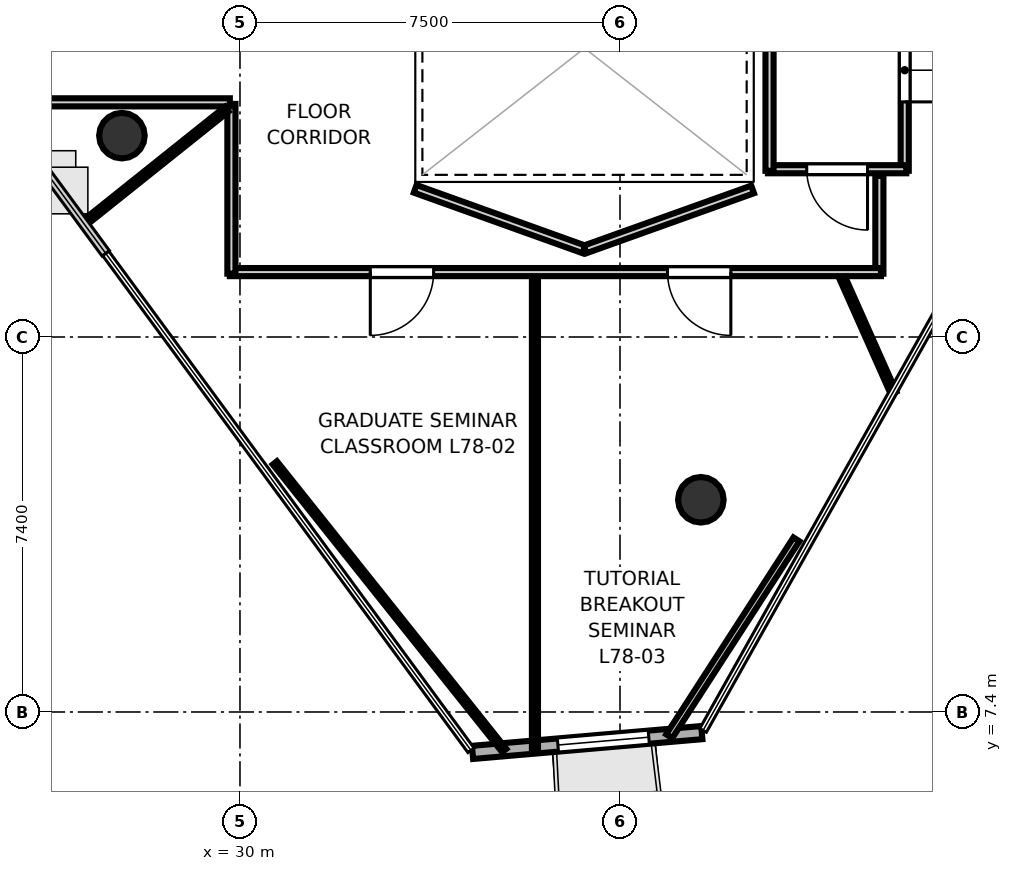
"""IFC4 building model, lengths in metres.
Left out: names, types, materials, properties, quantities, classifications, styles, units other than length and angle.
Written with IfcOpenShell. Run it as: python <this file> out.ifc"""

import sys

from ifc_helpers import new_model, si_unit, direction, frame, frame_2d, origin, origin_2d, place, context, subcontext, project, spatial, rectangle, hollow_circle, extrude, element, fill, save


model = new_model("IFC4")
c1 = context("Model", 3, precision=1e-05, world=origin(), true_north=direction((0.0, 1.0)))
c2 = subcontext(c1, "Body", "Model", "MODEL_VIEW")
j1 = project(units=[si_unit("LENGTHUNIT", "METRE"), si_unit("PLANEANGLEUNIT", "RADIAN")], contexts=[c1])
p1 = place(None, origin())
s1 = spatial("IfcSite", under=j1, at=p1, CompositionType="ELEMENT")
p2 = place(p1, origin())
s2 = spatial("IfcBuilding", under=s1, at=p2, CompositionType="ELEMENT")
p3 = place(p2, frame((0.0, 0.0, 302.8)))
s3 = spatial("IfcBuildingStorey", under=s2, at=p3, CompositionType="ELEMENT", Elevation=302.8)
for number, where, z_axis, x_axis in (
    (1, (27.67, 18.774, 0.0), (0.0, 0.0, 1.0), (1.0, 0.0, 0.0)),
    (2, (39.096, 11.588, 0.0), (0.0, 0.0, 1.0), (1.0, 0.0, 0.0)),
):
    element("IfcColumn", number, at=place(p3, frame(where, z_axis=z_axis, x_axis=x_axis)), inside=s3, PredefinedType="COLUMN", context=c2, shape_type="SweptSolid", body=[
        extrude(hollow_circle(Radius=0.45, WallThickness=0.025, at=origin_2d()), origin(), (0.0, 0.0, 1.0), 3.7),
    ])
p4 = place(p3, frame((34.59, 6.603, 0.0), z_axis=(0.0, 0.0, 1.0), x_axis=(0.996294451757, 0.086007937996, 0.0)))
e3 = element("IfcWall", 3, at=p4, inside=s3, PredefinedType="SOLIDWALL", context=c2, shape_type="SweptSolid", body=[
    extrude(rectangle(XDim=4.542, YDim=0.26, at=frame_2d((2.271, 0.0))), origin(), (0.0, 0.0, 1.0), 3.52),
])
p5 = place(p4, frame((1.691, 0.0, 0.85)))
e4 = element("IfcOpeningElement", 4, at=p5, cuts=e3, PredefinedType="OPENING", context=c2, shape_type="SweptSolid", body=[
    extrude(rectangle(XDim=1.8, YDim=2.1, at=frame_2d((0.9, 1.05))), frame((0.0, 0.14, 0.0), z_axis=(0.0, -1.0, 0.0), x_axis=(1.0, 0.0, 0.0)), (0.0, 0.0, 1.0), 0.28),
])
p6 = place(p3, frame((43.119, 22.05, 0.0), z_axis=(0.0, 0.0, 1.0), x_axis=(0.0, -1.0, 0.0)))
e5 = element("IfcWall", 5, at=p6, inside=s3, PredefinedType="PARTITIONING", context=c2, shape_type="SweptSolid", body=[
    extrude(rectangle(XDim=3.97, YDim=0.16, at=frame_2d((1.985, 0.0))), origin(), (0.0, 0.0, 1.0), 2.84),
])
p7 = place(p6, frame((1.36, 0.0, 0.0)))
e6 = element("IfcOpeningElement", 6, at=p7, cuts=e5, PredefinedType="OPENING", context=c2, shape_type="SweptSolid", body=[
    extrude(rectangle(XDim=1.25, YDim=2.2, at=frame_2d((0.625, 1.1))), frame((0.0, 0.09, 0.0), z_axis=(0.0, -1.0, 0.0), x_axis=(1.0, 0.0, 0.0)), (0.0, 0.0, 1.0), 0.18),
])
p8 = place(p3, frame((43.15, 18.111, 0.0), z_axis=(0.0, 0.0, 1.0), x_axis=(-1.0, 0.0, 0.0)))
e7 = element("IfcWall", 7, at=p8, inside=s3, PredefinedType="PARTITIONING", context=c2, shape_type="SweptSolid", body=[
    extrude(rectangle(XDim=2.73, YDim=0.16, at=frame_2d((1.365, 0.0))), origin(), (0.0, 0.0, 1.0), 2.84),
])
p9 = place(p8, frame((0.765, 0.0, 0.0)))
e8 = element("IfcOpeningElement", 8, at=p9, cuts=e7, PredefinedType="OPENING", context=c2, shape_type="SweptSolid", body=[
    extrude(rectangle(XDim=1.2, YDim=2.15, at=frame_2d((0.6, 1.075))), frame((0.0, 0.09, 0.0), z_axis=(0.0, -1.0, 0.0), x_axis=(1.0, 0.0, 0.0)), (0.0, 0.0, 1.0), 0.18),
])
p10 = place(p3, frame((40.451, 18.08, 0.0), z_axis=(0.0, 0.0, 1.0), x_axis=(0.0, 1.0, 0.0)))
e9 = element("IfcWall", 9, at=p10, inside=s3, PredefinedType="PARTITIONING", context=c2, shape_type="SweptSolid", body=[
    extrude(rectangle(XDim=3.32, YDim=0.16, at=frame_2d((1.66, 0.0))), origin(), (0.0, 0.0, 1.0), 2.84),
])
p11 = place(p3, frame((33.458, 17.724, 0.0), z_axis=(0.0, 0.0, 1.0), x_axis=(0.94128854789, -0.337603124408, 0.0)))
e10 = element("IfcWall", 10, at=p11, inside=s3, PredefinedType="PARTITIONING", context=c2, shape_type="SweptSolid", body=[
    extrude(rectangle(XDim=3.54, YDim=0.16, at=frame_2d((1.77, 0.0))), origin(), (0.0, 0.0, 1.0), 2.84),
])
p12 = place(p3, frame((36.81, 16.529, 0.0), z_axis=(0.0, 0.0, 1.0), x_axis=(0.941548344365, 0.33687789364, 0.0)))
e11 = element("IfcWall", 11, at=p12, inside=s3, PredefinedType="PARTITIONING", context=c2, shape_type="SweptSolid", body=[
    extrude(rectangle(XDim=3.513, YDim=0.16, at=frame_2d((1.756, 0.0))), origin(), (0.0, 0.0, 1.0), 2.84),
])
p13 = place(p3, frame((42.619, 17.98, 0.0), z_axis=(0.0, 0.0, 1.0), x_axis=(0.0, -1.0, 0.0)))
e12 = element("IfcWall", 12, at=p13, inside=s3, PredefinedType="PARTITIONING", context=c2, shape_type="SweptSolid", body=[
    extrude(rectangle(XDim=1.93, YDim=0.16, at=frame_2d((0.965, 0.0))), origin(), (0.0, 0.0, 1.0), 2.84),
])
p14 = place(p3, frame((42.65, 16.081, 0.0), z_axis=(0.0, 0.0, 1.0), x_axis=(-1.0, 0.0, 0.0)))
e13 = element("IfcWall", 13, at=p14, inside=s3, PredefinedType="PARTITIONING", context=c2, shape_type="SweptSolid", body=[
    extrude(rectangle(XDim=12.85, YDim=0.16, at=frame_2d((6.425, 0.0))), origin(), (0.0, 0.0, 1.0), 2.84),
])
p15 = place(p14, frame((8.828, 0.0, 0.0)))
e14 = element("IfcOpeningElement", 14, at=p15, cuts=e13, PredefinedType="OPENING", context=c2, shape_type="SweptSolid", body=[
    extrude(rectangle(XDim=1.25, YDim=2.2, at=frame_2d((0.625, 1.1))), frame((0.0, 0.09, 0.0), z_axis=(0.0, -1.0, 0.0), x_axis=(1.0, 0.0, 0.0)), (0.0, 0.0, 1.0), 0.18),
])
p16 = place(p14, frame((2.962, 0.0, 0.0)))
e15 = element("IfcOpeningElement", 15, at=p16, cuts=e13, PredefinedType="OPENING", context=c2, shape_type="SweptSolid", body=[
    extrude(rectangle(XDim=1.25, YDim=2.2, at=frame_2d((0.625, 1.1))), frame((0.0, 0.09, 0.0), z_axis=(0.0, -1.0, 0.0), x_axis=(1.0, 0.0, 0.0)), (0.0, 0.0, 1.0), 0.18),
])
p17 = place(p3, frame((29.831, 16.05, 0.0), z_axis=(0.0, 0.0, 1.0), x_axis=(0.0, 1.0, 0.0)))
e16 = element("IfcWall", 16, at=p17, inside=s3, PredefinedType="PARTITIONING", context=c2, shape_type="SweptSolid", body=[
    extrude(rectangle(XDim=3.35, YDim=0.16, at=frame_2d((1.675, 0.0))), origin(), (0.0, 0.0, 1.0), 2.84),
])
p18 = place(p3, frame((29.8, 19.431, 0.0), z_axis=(0.0, 0.0, 1.0), x_axis=(-1.0, 0.0, 0.0)))
e17 = element("IfcWall", 17, at=p18, inside=s3, PredefinedType="PARTITIONING", context=c2, shape_type="SweptSolid", body=[
    extrude(rectangle(XDim=4.66, YDim=0.16, at=frame_2d((2.33, 0.0))), origin(), (0.0, 0.0, 1.0), 2.84),
])
p19 = place(p3, frame((26.902, 17.028, 0.0), z_axis=(0.0, 0.0, 1.0), x_axis=(0.781137538784, 0.624358987684, 0.0)))
e18 = element("IfcWall", 18, at=p19, inside=s3, PredefinedType="PARTITIONING", context=c2, shape_type="SweptSolid", body=[
    extrude(rectangle(XDim=3.633, YDim=0.12, at=frame_2d((1.816, 0.0))), origin(), (0.0, 0.0, 1.0), 2.84),
])
p20 = place(p3, frame((35.821, 15.973, 0.0), z_axis=(0.0, 0.0, 1.0), x_axis=(0.0, -1.0, 0.0)))
e19 = element("IfcWall", 19, at=p20, inside=s3, PredefinedType="PARTITIONING", context=c2, shape_type="SweptSolid", body=[
    extrude(rectangle(XDim=9.284, YDim=0.12, at=frame_2d((4.642, 0.0))), origin(), (0.0, 0.0, 1.0), 2.84),
])
p21 = place(p3, frame((35.216, 6.639, 0.0), z_axis=(0.0, 0.0, 1.0), x_axis=(-0.623579218615, 0.781760166619, 0.0)))
e20 = element("IfcWall", 20, at=p21, inside=s3, PredefinedType="PARTITIONING", context=c2, shape_type="SweptSolid", body=[
    extrude(rectangle(XDim=7.262, YDim=0.105, at=frame_2d((3.631, 0.0))), origin(), (0.0, 0.0, 1.0), 2.84),
])
p22 = place(p3, frame((40.982, 10.807, 0.0), z_axis=(0.0, 0.0, 1.0), x_axis=(-0.542708512803, -0.839921109469, 0.0)))
e21 = element("IfcWall", 21, at=p22, inside=s3, PredefinedType="PARTITIONING", context=c2, shape_type="SweptSolid", body=[
    extrude(rectangle(XDim=4.626, YDim=0.14, at=frame_2d((2.313, 0.0))), origin(), (0.0, 0.0, 1.0), 2.84),
])
p23 = place(p3, frame((41.891, 15.958, 0.0), z_axis=(0.0, 0.0, 1.0), x_axis=(0.406778687401, -0.913526737144, 0.0)))
e22 = element("IfcWall", 22, at=p23, inside=s3, PredefinedType="PARTITIONING", context=c2, shape_type="SweptSolid", body=[
    extrude(rectangle(XDim=2.476, YDim=0.12, at=frame_2d((1.238, 0.0))), origin(), (0.0, 0.0, 1.0), 2.84),
])
p24 = place(p9, origin())
e23 = element("IfcDoor", 23, at=p24, inside=s3, OperationType="SINGLE_SWING_LEFT", PredefinedType="DOOR", context=c2, shape_type="SweptSolid", body=[
    extrude(rectangle(XDim=1.2, YDim=2.15, at=frame_2d((0.6, 1.075))), frame((0.0, 0.025, 0.0), z_axis=(0.0, -1.0, 0.0), x_axis=(1.0, 0.0, 0.0)), (0.0, 0.0, 1.0), 0.05),
])
fill(e8, e23)
p25 = place(p15, origin())
e24 = element("IfcDoor", 24, at=p25, inside=s3, OperationType="SINGLE_SWING_RIGHT", PredefinedType="DOOR", context=c2, shape_type="SweptSolid", body=[
    extrude(rectangle(XDim=1.25, YDim=2.2, at=frame_2d((0.625, 1.1))), frame((0.0, 0.025, 0.0), z_axis=(0.0, -1.0, 0.0), x_axis=(1.0, 0.0, 0.0)), (0.0, 0.0, 1.0), 0.05),
])
fill(e14, e24)
p26 = place(p16, origin())
e25 = element("IfcDoor", 25, at=p26, inside=s3, OperationType="SINGLE_SWING_LEFT", PredefinedType="DOOR", context=c2, shape_type="SweptSolid", body=[
    extrude(rectangle(XDim=1.25, YDim=2.2, at=frame_2d((0.625, 1.1))), frame((0.0, 0.025, 0.0), z_axis=(0.0, -1.0, 0.0), x_axis=(1.0, 0.0, 0.0)), (0.0, 0.0, 1.0), 0.05),
])
fill(e15, e25)
p27 = place(p7, origin())
e26 = element("IfcDoor", 26, at=p27, inside=s3, OperationType="SINGLE_SWING_RIGHT", PredefinedType="DOOR", context=c2, shape_type="SweptSolid", body=[
    extrude(rectangle(XDim=1.25, YDim=2.2, at=frame_2d((0.625, 1.1))), frame((0.0, 0.025, 0.0), z_axis=(0.0, -1.0, 0.0), x_axis=(1.0, 0.0, 0.0)), (0.0, 0.0, 1.0), 0.05),
])
fill(e6, e26)
p28 = place(p5, origin())
e27 = element("IfcWindow", 27, at=p28, inside=s3, PartitioningType="SINGLE_PANEL", PredefinedType="WINDOW", context=c2, shape_type="SweptSolid", body=[
    extrude(rectangle(XDim=1.8, YDim=2.1, at=frame_2d((0.9, 1.05))), frame((0.0, 0.03, 0.0), z_axis=(0.0, -1.0, 0.0), x_axis=(1.0, 0.0, 0.0)), (0.0, 0.0, 1.0), 0.06),
])
fill(e4, e27)
save(model, sys.argv[1])
